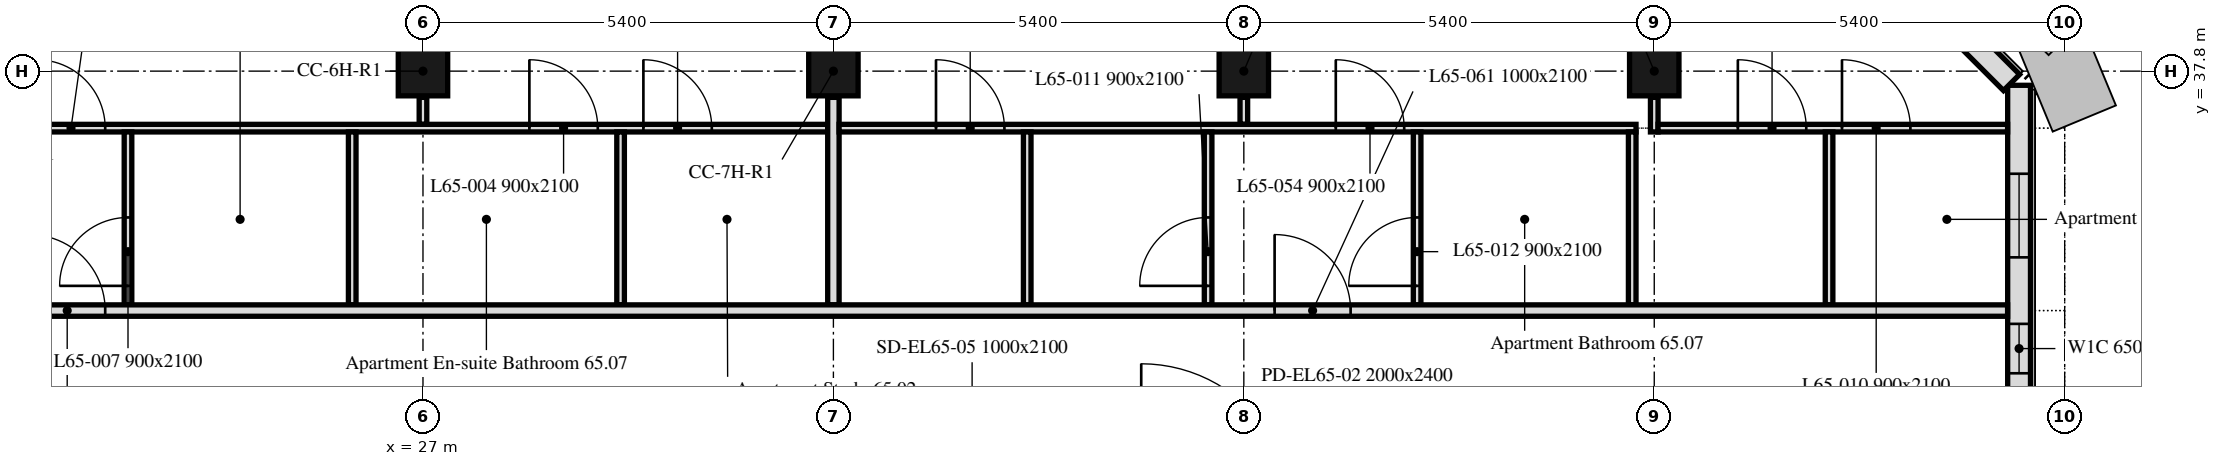
"""IFC4 building model, lengths in metres.
Left out: names, types, materials, properties, quantities, classifications, styles, units other than length and angle.
Written with IfcOpenShell. Run it as: python <this file> out.ifc"""

import sys

from ifc_helpers import new_model, si_unit, direction, frame, frame_2d, origin, origin_2d, place, context, subcontext, project, spatial, rectangle, extrude, element, fill, save


model = new_model("IFC4")
c1 = context("Model", 3, precision=1e-05, world=origin(), true_north=direction((0.0, 1.0)))
c2 = subcontext(c1, "Body", "Model", "MODEL_VIEW")
j1 = project(units=[si_unit("LENGTHUNIT", "METRE"), si_unit("PLANEANGLEUNIT", "RADIAN")], contexts=[c1])
p1 = place(None, origin())
s1 = spatial("IfcSite", under=j1, at=p1, CompositionType="ELEMENT")
p2 = place(p1, origin())
s2 = spatial("IfcBuilding", under=s1, at=p2, CompositionType="ELEMENT")
p3 = place(p2, frame((0.0, 0.0, 268.6)))
s3 = spatial("IfcBuildingStorey", under=s2, at=p3, CompositionType="ELEMENT", Elevation=268.6)
for number, where, z_axis, x_axis in (
    (1, (27.0, 37.8, 0.0), (0.0, 0.0, 1.0), (1.0, 0.0, 0.0)),
    (2, (32.4, 37.8, 0.0), (0.0, 0.0, 1.0), (1.0, 0.0, 0.0)),
    (3, (37.8, 37.8, 0.0), (0.0, 0.0, 1.0), (1.0, 0.0, 0.0)),
    (4, (43.2, 37.8, 0.0), (0.0, 0.0, 1.0), (1.0, 0.0, 0.0)),
):
    element("IfcColumn", number, at=place(p3, frame(where, z_axis=z_axis, x_axis=x_axis)), inside=s3, PredefinedType="COLUMN", context=c2, shape_type="SweptSolid", body=[
        extrude(rectangle(XDim=0.65, YDim=0.65, at=origin_2d()), origin(), (0.0, 0.0, 1.0), 3.0),
    ])
p4 = place(p3, frame((48.0, 5.586, 0.0), z_axis=(0.0, 0.0, 1.0), x_axis=(0.0, 1.0, 0.0)))
e5 = element("IfcWall", 5, at=p4, inside=s3, PredefinedType="SOLIDWALL", context=c2, shape_type="SweptSolid", body=[
    extrude(rectangle(XDim=32.027, YDim=0.3, at=frame_2d((16.014, 0.0))), origin(), (0.0, 0.0, 1.0), 3.0),
])
p5 = place(p4, frame((1.314, 0.0, 0.9)))
e6 = element("IfcOpeningElement", 6, at=p5, cuts=e5, PredefinedType="OPENING", context=c2, shape_type="SweptSolid", body=[
    extrude(rectangle(XDim=1.1, YDim=1.7, at=frame_2d((0.55, 0.85))), frame((0.0, 0.16, 0.0), z_axis=(0.0, -1.0, 0.0), x_axis=(1.0, 0.0, 0.0)), (0.0, 0.0, 1.0), 0.32),
])
p6 = place(p4, frame((2.764, 0.0, 0.9)))
e7 = element("IfcOpeningElement", 7, at=p6, cuts=e5, PredefinedType="OPENING", context=c2, shape_type="SweptSolid", body=[
    extrude(rectangle(XDim=1.1, YDim=1.7, at=frame_2d((0.55, 0.85))), frame((0.0, 0.16, 0.0), z_axis=(0.0, -1.0, 0.0), x_axis=(1.0, 0.0, 0.0)), (0.0, 0.0, 1.0), 0.32),
])
p7 = place(p4, frame((6.564, 0.0, 0.9)))
e8 = element("IfcOpeningElement", 8, at=p7, cuts=e5, PredefinedType="OPENING", context=c2, shape_type="SweptSolid", body=[
    extrude(rectangle(XDim=1.1, YDim=1.7, at=frame_2d((0.55, 0.85))), frame((0.0, 0.16, 0.0), z_axis=(0.0, -1.0, 0.0), x_axis=(1.0, 0.0, 0.0)), (0.0, 0.0, 1.0), 0.32),
])
p8 = place(p4, frame((8.514, 0.0, 0.9)))
e9 = element("IfcOpeningElement", 9, at=p8, cuts=e5, PredefinedType="OPENING", context=c2, shape_type="SweptSolid", body=[
    extrude(rectangle(XDim=1.1, YDim=1.7, at=frame_2d((0.55, 0.85))), frame((0.0, 0.16, 0.0), z_axis=(0.0, -1.0, 0.0), x_axis=(1.0, 0.0, 0.0)), (0.0, 0.0, 1.0), 0.32),
])
p9 = place(p4, frame((11.964, 0.0, 0.9)))
e10 = element("IfcOpeningElement", 10, at=p9, cuts=e5, PredefinedType="OPENING", context=c2, shape_type="SweptSolid", body=[
    extrude(rectangle(XDim=1.1, YDim=1.7, at=frame_2d((0.55, 0.85))), frame((0.0, 0.16, 0.0), z_axis=(0.0, -1.0, 0.0), x_axis=(1.0, 0.0, 0.0)), (0.0, 0.0, 1.0), 0.32),
])
p10 = place(p4, frame((13.564, 0.0, 0.9)))
e11 = element("IfcOpeningElement", 11, at=p10, cuts=e5, PredefinedType="OPENING", context=c2, shape_type="SweptSolid", body=[
    extrude(rectangle(XDim=1.1, YDim=1.7, at=frame_2d((0.55, 0.85))), frame((0.0, 0.16, 0.0), z_axis=(0.0, -1.0, 0.0), x_axis=(1.0, 0.0, 0.0)), (0.0, 0.0, 1.0), 0.32),
])
p11 = place(p4, frame((17.014, 0.0, 0.9)))
e12 = element("IfcOpeningElement", 12, at=p11, cuts=e5, PredefinedType="OPENING", context=c2, shape_type="SweptSolid", body=[
    extrude(rectangle(XDim=3.4, YDim=1.7, at=frame_2d((1.7, 0.85))), frame((0.0, 0.16, 0.0), z_axis=(0.0, -1.0, 0.0), x_axis=(1.0, 0.0, 0.0)), (0.0, 0.0, 1.0), 0.32),
])
p12 = place(p4, frame((22.764, 0.0, 0.9)))
e13 = element("IfcOpeningElement", 13, at=p12, cuts=e5, PredefinedType="OPENING", context=c2, shape_type="SweptSolid", body=[
    extrude(rectangle(XDim=1.1, YDim=1.7, at=frame_2d((0.55, 0.85))), frame((0.0, 0.16, 0.0), z_axis=(0.0, -1.0, 0.0), x_axis=(1.0, 0.0, 0.0)), (0.0, 0.0, 1.0), 0.32),
])
p13 = place(p4, frame((24.364, 0.0, 0.9)))
e14 = element("IfcOpeningElement", 14, at=p13, cuts=e5, PredefinedType="OPENING", context=c2, shape_type="SweptSolid", body=[
    extrude(rectangle(XDim=1.1, YDim=1.7, at=frame_2d((0.55, 0.85))), frame((0.0, 0.16, 0.0), z_axis=(0.0, -1.0, 0.0), x_axis=(1.0, 0.0, 0.0)), (0.0, 0.0, 1.0), 0.32),
])
p14 = place(p4, frame((28.239, 0.0, 0.9)))
e15 = element("IfcOpeningElement", 15, at=p14, cuts=e5, PredefinedType="OPENING", context=c2, shape_type="SweptSolid", body=[
    extrude(rectangle(XDim=0.65, YDim=1.7, at=frame_2d((0.325, 0.85))), frame((0.0, 0.16, 0.0), z_axis=(0.0, -1.0, 0.0), x_axis=(1.0, 0.0, 0.0)), (0.0, 0.0, 1.0), 0.32),
])
p15 = place(p4, frame((29.764, 0.0, 0.9)))
e16 = element("IfcOpeningElement", 16, at=p15, cuts=e5, PredefinedType="OPENING", context=c2, shape_type="SweptSolid", body=[
    extrude(rectangle(XDim=1.1, YDim=1.7, at=frame_2d((0.55, 0.85))), frame((0.0, 0.16, 0.0), z_axis=(0.0, -1.0, 0.0), x_axis=(1.0, 0.0, 0.0)), (0.0, 0.0, 1.0), 0.32),
])
p16 = place(p3, frame((47.901, 37.65, 0.0), z_axis=(0.0, 0.0, 1.0), x_axis=(-0.707106781187, 0.707106781187, 0.0)))
e17 = element("IfcWall", 17, at=p16, inside=s3, PredefinedType="SOLIDWALL", context=c2, shape_type="SweptSolid", body=[
    extrude(rectangle(XDim=6.86, YDim=0.3, at=frame_2d((3.43, 0.0))), origin(), (0.0, 0.0, 1.0), 3.0),
])
p17 = place(p16, frame((1.28, 0.0, 0.9)))
e18 = element("IfcOpeningElement", 18, at=p17, cuts=e17, PredefinedType="OPENING", context=c2, shape_type="SweptSolid", body=[
    extrude(rectangle(XDim=1.1, YDim=1.7, at=frame_2d((0.55, 0.85))), frame((0.0, 0.16, 0.0), z_axis=(0.0, -1.0, 0.0), x_axis=(1.0, 0.0, 0.0)), (0.0, 0.0, 1.0), 0.32),
])
p18 = place(p16, frame((4.48, 0.0, 0.9)))
e19 = element("IfcOpeningElement", 19, at=p18, cuts=e17, PredefinedType="OPENING", context=c2, shape_type="SweptSolid", body=[
    extrude(rectangle(XDim=1.1, YDim=1.7, at=frame_2d((0.55, 0.85))), frame((0.0, 0.16, 0.0), z_axis=(0.0, -1.0, 0.0), x_axis=(1.0, 0.0, 0.0)), (0.0, 0.0, 1.0), 0.32),
])
p19 = place(p3, frame((27.0, 37.1, 0.0), z_axis=(0.0, 0.0, 1.0), x_axis=(0.0, 1.0, 0.0)))
e20 = element("IfcWall", 20, at=p19, inside=s3, PredefinedType="PARTITIONING", context=c2, shape_type="SweptSolid", body=[
    extrude(rectangle(XDim=0.355, YDim=0.1, at=frame_2d((0.177, 0.0))), origin(), (0.0, 0.0, 1.0), 3.0),
])
p20 = place(p3, frame((16.275, 37.05, 0.0), z_axis=(0.0, 0.0, 1.0), x_axis=(1.0, 0.0, 0.0)))
e21 = element("IfcWall", 21, at=p20, inside=s3, PredefinedType="PARTITIONING", context=c2, shape_type="SweptSolid", body=[
    extrude(rectangle(XDim=16.05, YDim=0.1, at=frame_2d((8.025, 0.0))), origin(), (0.0, 0.0, 1.0), 3.0),
])
p21 = place(p20, frame((1.453, 0.0, 0.0)))
e22 = element("IfcOpeningElement", 22, at=p21, cuts=e21, PredefinedType="OPENING", context=c2, shape_type="SweptSolid", body=[
    extrude(rectangle(XDim=0.9, YDim=2.1, at=frame_2d((0.45, 1.05))), frame((0.0, 0.05, 0.0), z_axis=(0.0, -1.0, 0.0), x_axis=(1.0, 0.0, 0.0)), (0.0, 0.0, 1.0), 0.1),
])
p22 = place(p20, frame((12.125, 0.0, 0.0)))
e23 = element("IfcOpeningElement", 23, at=p22, cuts=e21, PredefinedType="OPENING", context=c2, shape_type="SweptSolid", body=[
    extrude(rectangle(XDim=0.9, YDim=2.1, at=frame_2d((0.45, 1.05))), frame((0.0, 0.05, 0.0), z_axis=(0.0, -1.0, 0.0), x_axis=(1.0, 0.0, 0.0)), (0.0, 0.0, 1.0), 0.1),
])
p23 = place(p20, frame((13.625, 0.0, 0.0)))
e24 = element("IfcOpeningElement", 24, at=p23, cuts=e21, PredefinedType="OPENING", context=c2, shape_type="SweptSolid", body=[
    extrude(rectangle(XDim=0.9, YDim=2.1, at=frame_2d((0.45, 1.05))), frame((0.0, 0.05, 0.0), z_axis=(0.0, -1.0, 0.0), x_axis=(1.0, 0.0, 0.0)), (0.0, 0.0, 1.0), 0.1),
])
p24 = place(p20, frame((5.644, 0.0, 0.0)))
e25 = element("IfcOpeningElement", 25, at=p24, cuts=e21, PredefinedType="OPENING", context=c2, shape_type="SweptSolid", body=[
    extrude(rectangle(XDim=0.9, YDim=2.1, at=frame_2d((0.45, 1.05))), frame((0.0, 0.05, 0.0), z_axis=(0.0, -1.0, 0.0), x_axis=(1.0, 0.0, 0.0)), (0.0, 0.0, 1.0), 0.1),
])
p25 = place(p3, frame((23.119, 34.725, 0.0), z_axis=(0.0, 0.0, 1.0), x_axis=(0.0, 1.0, 0.0)))
e26 = element("IfcWall", 26, at=p25, inside=s3, PredefinedType="PARTITIONING", context=c2, shape_type="SweptSolid", body=[
    extrude(rectangle(XDim=2.275, YDim=0.1, at=frame_2d((1.137, 0.0))), origin(), (0.0, 0.0, 1.0), 3.0),
])
p26 = place(p25, frame((0.25, 0.0, 0.0)))
e27 = element("IfcOpeningElement", 27, at=p26, cuts=e26, PredefinedType="OPENING", context=c2, shape_type="SweptSolid", body=[
    extrude(rectangle(XDim=0.9, YDim=2.1, at=frame_2d((0.45, 1.05))), frame((0.0, 0.05, 0.0), z_axis=(0.0, -1.0, 0.0), x_axis=(1.0, 0.0, 0.0)), (0.0, 0.0, 1.0), 0.1),
])
for number, where, z_axis, x_axis in (
    (28, (26.069, 34.725, 0.0), (0.0, 0.0, 1.0), (0.0, 1.0, 0.0)),
    (29, (29.6, 34.725, 0.0), (0.0, 0.0, 1.0), (0.0, 1.0, 0.0)),
):
    element("IfcWall", number, at=place(p3, frame(where, z_axis=z_axis, x_axis=x_axis)), inside=s3, PredefinedType="PARTITIONING", context=c2, shape_type="SweptSolid", body=[
        extrude(rectangle(XDim=2.275, YDim=0.1, at=frame_2d((1.137, 0.0))), origin(), (0.0, 0.0, 1.0), 3.0),
    ])
p27 = place(p3, frame((32.4, 34.725, 0.0), z_axis=(0.0, 0.0, 1.0), x_axis=(0.0, 1.0, 0.0)))
e30 = element("IfcWall", 30, at=p27, inside=s3, PredefinedType="PARTITIONING", context=c2, shape_type="SweptSolid", body=[
    extrude(rectangle(XDim=2.73, YDim=0.15, at=frame_2d((1.365, 0.0))), origin(), (0.0, 0.0, 1.0), 3.0),
])
p28 = place(p3, frame((37.8, 37.1, 0.0), z_axis=(0.0, 0.0, 1.0), x_axis=(0.0, 1.0, 0.0)))
e31 = element("IfcWall", 31, at=p28, inside=s3, PredefinedType="PARTITIONING", context=c2, shape_type="SweptSolid", body=[
    extrude(rectangle(XDim=0.355, YDim=0.1, at=frame_2d((0.177, 0.0))), origin(), (0.0, 0.0, 1.0), 3.0),
])
p29 = place(p3, frame((32.475, 37.05, 0.0), z_axis=(0.0, 0.0, 1.0), x_axis=(1.0, 0.0, 0.0)))
e32 = element("IfcWall", 32, at=p29, inside=s3, PredefinedType="PARTITIONING", context=c2, shape_type="SweptSolid", body=[
    extrude(rectangle(XDim=10.485, YDim=0.1, at=frame_2d((5.242, 0.0))), origin(), (0.0, 0.0, 1.0), 3.0),
])
p30 = place(p29, frame((1.275, 0.0, 0.0)))
e33 = element("IfcOpeningElement", 33, at=p30, cuts=e32, PredefinedType="OPENING", context=c2, shape_type="SweptSolid", body=[
    extrude(rectangle(XDim=0.9, YDim=2.1, at=frame_2d((0.45, 1.05))), frame((0.0, 0.05, 0.0), z_axis=(0.0, -1.0, 0.0), x_axis=(1.0, 0.0, 0.0)), (0.0, 0.0, 1.0), 0.1),
])
p31 = place(p29, frame((6.535, 0.0, 0.0)))
e34 = element("IfcOpeningElement", 34, at=p31, cuts=e32, PredefinedType="OPENING", context=c2, shape_type="SweptSolid", body=[
    extrude(rectangle(XDim=0.9, YDim=2.1, at=frame_2d((0.45, 1.05))), frame((0.0, 0.05, 0.0), z_axis=(0.0, -1.0, 0.0), x_axis=(1.0, 0.0, 0.0)), (0.0, 0.0, 1.0), 0.1),
])
p32 = place(p3, frame((43.2, 37.0, 0.0), z_axis=(0.0, 0.0, 1.0), x_axis=(0.0, 1.0, 0.0)))
e35 = element("IfcWall", 35, at=p32, inside=s3, PredefinedType="PARTITIONING", context=c2, shape_type="SweptSolid", body=[
    extrude(rectangle(XDim=0.455, YDim=0.1, at=frame_2d((0.228, 0.0))), origin(), (0.0, 0.0, 1.0), 3.0),
])
p33 = place(p3, frame((43.25, 37.05, 0.0), z_axis=(0.0, 0.0, 1.0), x_axis=(1.0, 0.0, 0.0)))
e36 = element("IfcWall", 36, at=p33, inside=s3, PredefinedType="PARTITIONING", context=c2, shape_type="SweptSolid", body=[
    extrude(rectangle(XDim=4.599, YDim=0.1, at=frame_2d((2.3, 0.0))), origin(), (0.0, 0.0, 1.0), 3.0),
])
p34 = place(p33, frame((1.05, 0.0, 0.0)))
e37 = element("IfcOpeningElement", 37, at=p34, cuts=e36, PredefinedType="OPENING", context=c2, shape_type="SweptSolid", body=[
    extrude(rectangle(XDim=0.9, YDim=2.1, at=frame_2d((0.45, 1.05))), frame((0.0, 0.05, 0.0), z_axis=(0.0, -1.0, 0.0), x_axis=(1.0, 0.0, 0.0)), (0.0, 0.0, 1.0), 0.1),
])
p35 = place(p33, frame((2.42, 0.0, 0.0)))
e38 = element("IfcOpeningElement", 38, at=p35, cuts=e36, PredefinedType="OPENING", context=c2, shape_type="SweptSolid", body=[
    extrude(rectangle(XDim=0.9, YDim=2.1, at=frame_2d((0.45, 1.05))), frame((0.0, 0.05, 0.0), z_axis=(0.0, -1.0, 0.0), x_axis=(1.0, 0.0, 0.0)), (0.0, 0.0, 1.0), 0.1),
])
p36 = place(p3, frame((34.95, 34.725, 0.0), z_axis=(0.0, 0.0, 1.0), x_axis=(0.0, 1.0, 0.0)))
e39 = element("IfcWall", 39, at=p36, inside=s3, PredefinedType="PARTITIONING", context=c2, shape_type="SweptSolid", body=[
    extrude(rectangle(XDim=2.275, YDim=0.1, at=frame_2d((1.137, 0.0))), origin(), (0.0, 0.0, 1.0), 3.0),
])
p37 = place(p3, frame((37.33, 34.725, 0.0), z_axis=(0.0, 0.0, 1.0), x_axis=(0.0, 1.0, 0.0)))
e40 = element("IfcWall", 40, at=p37, inside=s3, PredefinedType="PARTITIONING", context=c2, shape_type="SweptSolid", body=[
    extrude(rectangle(XDim=2.275, YDim=0.1, at=frame_2d((1.137, 0.0))), origin(), (0.0, 0.0, 1.0), 3.0),
])
p38 = place(p37, frame((0.25, 0.0, 0.0)))
e41 = element("IfcOpeningElement", 41, at=p38, cuts=e40, PredefinedType="OPENING", context=c2, shape_type="SweptSolid", body=[
    extrude(rectangle(XDim=0.9, YDim=2.1, at=frame_2d((0.45, 1.05))), frame((0.0, 0.05, 0.0), z_axis=(0.0, -1.0, 0.0), x_axis=(1.0, 0.0, 0.0)), (0.0, 0.0, 1.0), 0.1),
])
p39 = place(p3, frame((40.08, 34.725, 0.0), z_axis=(0.0, 0.0, 1.0), x_axis=(0.0, 1.0, 0.0)))
e42 = element("IfcWall", 42, at=p39, inside=s3, PredefinedType="PARTITIONING", context=c2, shape_type="SweptSolid", body=[
    extrude(rectangle(XDim=2.275, YDim=0.1, at=frame_2d((1.137, 0.0))), origin(), (0.0, 0.0, 1.0), 3.0),
])
p40 = place(p39, frame((0.25, 0.0, 0.0)))
e43 = element("IfcOpeningElement", 43, at=p40, cuts=e42, PredefinedType="OPENING", context=c2, shape_type="SweptSolid", body=[
    extrude(rectangle(XDim=0.9, YDim=2.1, at=frame_2d((0.45, 1.05))), frame((0.0, 0.05, 0.0), z_axis=(0.0, -1.0, 0.0), x_axis=(1.0, 0.0, 0.0)), (0.0, 0.0, 1.0), 0.1),
])
for number, where, z_axis, x_axis in (
    (44, (42.91, 34.725, 0.0), (0.0, 0.0, 1.0), (0.0, 1.0, 0.0)),
    (45, (45.5, 34.725, 0.0), (0.0, 0.0, 1.0), (0.0, 1.0, 0.0)),
):
    element("IfcWall", number, at=place(p3, frame(where, z_axis=z_axis, x_axis=x_axis)), inside=s3, PredefinedType="PARTITIONING", context=c2, shape_type="SweptSolid", body=[
        extrude(rectangle(XDim=2.275, YDim=0.1, at=frame_2d((1.137, 0.0))), origin(), (0.0, 0.0, 1.0), 3.0),
    ])
p41 = place(p3, frame((6.151, 34.65, 0.0), z_axis=(0.0, 0.0, 1.0), x_axis=(1.0, 0.0, 0.0)))
e46 = element("IfcWall", 46, at=p41, inside=s3, PredefinedType="PARTITIONING", context=c2, shape_type="SweptSolid", body=[
    extrude(rectangle(XDim=41.698, YDim=0.15, at=frame_2d((20.849, 0.0))), origin(), (0.0, 0.0, 1.0), 3.0),
])
p42 = place(p41, frame((2.969, 0.0, 0.0)))
e47 = element("IfcOpeningElement", 47, at=p42, cuts=e46, PredefinedType="OPENING", context=c2, shape_type="SweptSolid", body=[
    extrude(rectangle(XDim=1.0, YDim=2.1, at=frame_2d((0.5, 1.05))), frame((0.0, 0.075, 0.0), z_axis=(0.0, -1.0, 0.0), x_axis=(1.0, 0.0, 0.0)), (0.0, 0.0, 1.0), 0.15),
])
p43 = place(p41, frame((15.668, 0.0, 0.0)))
e48 = element("IfcOpeningElement", 48, at=p43, cuts=e46, PredefinedType="OPENING", context=c2, shape_type="SweptSolid", body=[
    extrude(rectangle(XDim=1.0, YDim=2.1, at=frame_2d((0.5, 1.05))), frame((0.0, 0.075, 0.0), z_axis=(0.0, -1.0, 0.0), x_axis=(1.0, 0.0, 0.0)), (0.0, 0.0, 1.0), 0.15),
])
p44 = place(p41, frame((32.054, 0.0, 0.0)))
e49 = element("IfcOpeningElement", 49, at=p44, cuts=e46, PredefinedType="OPENING", context=c2, shape_type="SweptSolid", body=[
    extrude(rectangle(XDim=1.0, YDim=2.1, at=frame_2d((0.5, 1.05))), frame((0.0, 0.075, 0.0), z_axis=(0.0, -1.0, 0.0), x_axis=(1.0, 0.0, 0.0)), (0.0, 0.0, 1.0), 0.15),
])
p45 = place(p14, origin())
e50 = element("IfcWindow", 50, at=p45, inside=s3, PartitioningType="SINGLE_PANEL", PredefinedType="WINDOW", context=c2, shape_type="SweptSolid", body=[
    extrude(rectangle(XDim=0.65, YDim=1.7, at=frame_2d((0.325, 0.85))), frame((0.0, 0.03, 0.0), z_axis=(0.0, -1.0, 0.0), x_axis=(1.0, 0.0, 0.0)), (0.0, 0.0, 1.0), 0.06),
])
fill(e15, e50)
p46 = place(p15, origin())
e51 = element("IfcWindow", 51, at=p46, inside=s3, PartitioningType="SINGLE_PANEL", PredefinedType="WINDOW", context=c2, shape_type="SweptSolid", body=[
    extrude(rectangle(XDim=1.1, YDim=1.7, at=frame_2d((0.55, 0.85))), frame((0.0, 0.03, 0.0), z_axis=(0.0, -1.0, 0.0), x_axis=(1.0, 0.0, 0.0)), (0.0, 0.0, 1.0), 0.06),
])
fill(e16, e51)
p47 = place(p22, origin())
e52 = element("IfcDoor", 52, at=p47, inside=s3, OperationType="SINGLE_SWING_RIGHT", PredefinedType="DOOR", context=c2, shape_type="SweptSolid", body=[
    extrude(rectangle(XDim=0.9, YDim=2.1, at=frame_2d((0.45, 1.05))), frame((0.0, 0.025, 0.0), z_axis=(0.0, -1.0, 0.0), x_axis=(1.0, 0.0, 0.0)), (0.0, 0.0, 1.0), 0.05),
])
fill(e23, e52)
p48 = place(p23, origin())
e53 = element("IfcDoor", 53, at=p48, inside=s3, OperationType="SINGLE_SWING_LEFT", PredefinedType="DOOR", context=c2, shape_type="SweptSolid", body=[
    extrude(rectangle(XDim=0.9, YDim=2.1, at=frame_2d((0.45, 1.05))), frame((0.0, 0.025, 0.0), z_axis=(0.0, -1.0, 0.0), x_axis=(1.0, 0.0, 0.0)), (0.0, 0.0, 1.0), 0.05),
])
fill(e24, e53)
p49 = place(p26, origin())
e54 = element("IfcDoor", 54, at=p49, inside=s3, OperationType="SINGLE_SWING_LEFT", PredefinedType="DOOR", context=c2, shape_type="SweptSolid", body=[
    extrude(rectangle(XDim=0.9, YDim=2.1, at=frame_2d((0.45, 1.05))), frame((0.0, 0.025, 0.0), z_axis=(0.0, -1.0, 0.0), x_axis=(1.0, 0.0, 0.0)), (0.0, 0.0, 1.0), 0.05),
])
fill(e27, e54)
p50 = place(p30, origin())
e55 = element("IfcDoor", 55, at=p50, inside=s3, OperationType="SINGLE_SWING_LEFT", PredefinedType="DOOR", context=c2, shape_type="SweptSolid", body=[
    extrude(rectangle(XDim=0.9, YDim=2.1, at=frame_2d((0.45, 1.05))), frame((0.0, 0.025, 0.0), z_axis=(0.0, -1.0, 0.0), x_axis=(1.0, 0.0, 0.0)), (0.0, 0.0, 1.0), 0.05),
])
fill(e33, e55)
p51 = place(p34, origin())
e56 = element("IfcDoor", 56, at=p51, inside=s3, OperationType="SINGLE_SWING_RIGHT", PredefinedType="DOOR", context=c2, shape_type="SweptSolid", body=[
    extrude(rectangle(XDim=0.9, YDim=2.1, at=frame_2d((0.45, 1.05))), frame((0.0, 0.025, 0.0), z_axis=(0.0, -1.0, 0.0), x_axis=(1.0, 0.0, 0.0)), (0.0, 0.0, 1.0), 0.05),
])
fill(e37, e56)
p52 = place(p35, origin())
e57 = element("IfcDoor", 57, at=p52, inside=s3, OperationType="SINGLE_SWING_LEFT", PredefinedType="DOOR", context=c2, shape_type="SweptSolid", body=[
    extrude(rectangle(XDim=0.9, YDim=2.1, at=frame_2d((0.45, 1.05))), frame((0.0, 0.025, 0.0), z_axis=(0.0, -1.0, 0.0), x_axis=(1.0, 0.0, 0.0)), (0.0, 0.0, 1.0), 0.05),
])
fill(e38, e57)
p53 = place(p38, origin())
e58 = element("IfcDoor", 58, at=p53, inside=s3, OperationType="SINGLE_SWING_LEFT", PredefinedType="DOOR", context=c2, shape_type="SweptSolid", body=[
    extrude(rectangle(XDim=0.9, YDim=2.1, at=frame_2d((0.45, 1.05))), frame((0.0, 0.025, 0.0), z_axis=(0.0, -1.0, 0.0), x_axis=(1.0, 0.0, 0.0)), (0.0, 0.0, 1.0), 0.05),
])
fill(e41, e58)
p54 = place(p40, origin())
e59 = element("IfcDoor", 59, at=p54, inside=s3, OperationType="SINGLE_SWING_RIGHT", PredefinedType="DOOR", context=c2, shape_type="SweptSolid", body=[
    extrude(rectangle(XDim=0.9, YDim=2.1, at=frame_2d((0.45, 1.05))), frame((0.0, 0.025, 0.0), z_axis=(0.0, -1.0, 0.0), x_axis=(1.0, 0.0, 0.0)), (0.0, 0.0, 1.0), 0.05),
])
fill(e43, e59)
p55 = place(p24, origin())
e60 = element("IfcDoor", 60, at=p55, inside=s3, OperationType="SINGLE_SWING_RIGHT", PredefinedType="DOOR", context=c2, shape_type="SweptSolid", body=[
    extrude(rectangle(XDim=0.9, YDim=2.1, at=frame_2d((0.45, 1.05))), frame((0.0, 0.025, 0.0), z_axis=(0.0, -1.0, 0.0), x_axis=(1.0, 0.0, 0.0)), (0.0, 0.0, 1.0), 0.05),
])
fill(e25, e60)
p56 = place(p31, origin())
e61 = element("IfcDoor", 61, at=p56, inside=s3, OperationType="SINGLE_SWING_LEFT", PredefinedType="DOOR", context=c2, shape_type="SweptSolid", body=[
    extrude(rectangle(XDim=0.9, YDim=2.1, at=frame_2d((0.45, 1.05))), frame((0.0, 0.025, 0.0), z_axis=(0.0, -1.0, 0.0), x_axis=(1.0, 0.0, 0.0)), (0.0, 0.0, 1.0), 0.05),
])
fill(e34, e61)
p57 = place(p43, origin())
e62 = element("IfcDoor", 62, at=p57, inside=s3, OperationType="SINGLE_SWING_LEFT", PredefinedType="DOOR", context=c2, shape_type="SweptSolid", body=[
    extrude(rectangle(XDim=1.0, YDim=2.1, at=frame_2d((0.5, 1.05))), frame((0.0, 0.025, 0.0), z_axis=(0.0, -1.0, 0.0), x_axis=(1.0, 0.0, 0.0)), (0.0, 0.0, 1.0), 0.05),
])
fill(e48, e62)
p58 = place(p44, origin())
e63 = element("IfcDoor", 63, at=p58, inside=s3, OperationType="SINGLE_SWING_RIGHT", PredefinedType="DOOR", context=c2, shape_type="SweptSolid", body=[
    extrude(rectangle(XDim=1.0, YDim=2.1, at=frame_2d((0.5, 1.05))), frame((0.0, 0.025, 0.0), z_axis=(0.0, -1.0, 0.0), x_axis=(1.0, 0.0, 0.0)), (0.0, 0.0, 1.0), 0.05),
])
fill(e49, e63)
save(model, sys.argv[1])
